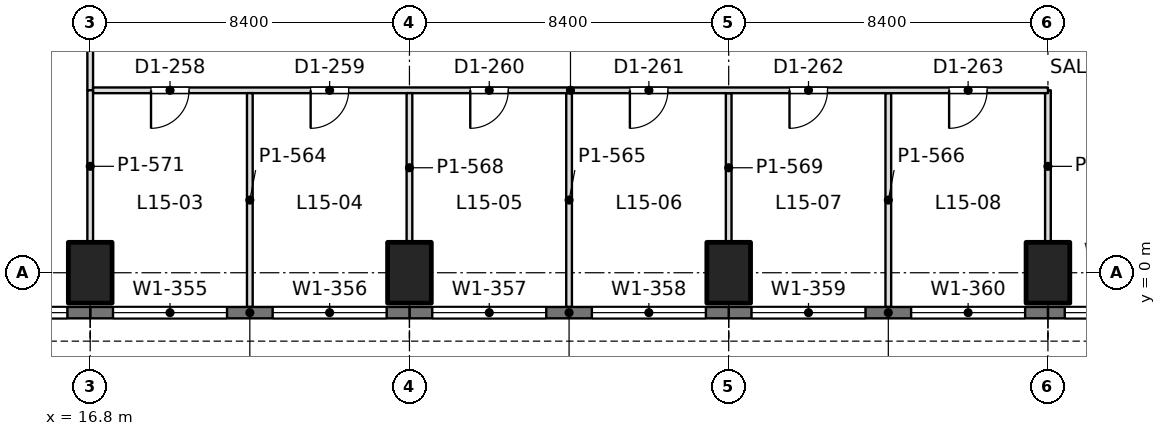
"""IFC4 building model, lengths in metres.
Left out: names, types, materials, properties, quantities, classifications, styles, units other than length and angle.
Written with IfcOpenShell. Run it as: python <this file> out.ifc"""

import sys

from ifc_helpers import new_model, si_unit, direction, frame, frame_2d, origin, origin_2d, place, context, subcontext, project, spatial, rectangle, extrude, element, fill, save


model = new_model("IFC4")
c1 = context("Model", 3, precision=1e-05, world=origin(), true_north=direction((0.0, 1.0)))
c2 = subcontext(c1, "Body", "Model", "MODEL_VIEW")
j1 = project(units=[si_unit("LENGTHUNIT", "METRE"), si_unit("PLANEANGLEUNIT", "RADIAN")], contexts=[c1])
p1 = place(None, origin())
s1 = spatial("IfcSite", under=j1, at=p1, CompositionType="ELEMENT")
p2 = place(p1, origin())
s2 = spatial("IfcBuilding", under=s1, at=p2, CompositionType="ELEMENT")
p3 = place(p2, frame((0.0, 0.0, 68.4)))
s3 = spatial("IfcBuildingStorey", under=s2, at=p3, CompositionType="ELEMENT", Elevation=68.4)
for number, where, z_axis, x_axis in (
    (1, (16.8, 0.0, 0.0), (0.0, 0.0, 1.0), (1.0, 0.0, 0.0)),
    (2, (25.2, 0.0, 0.0), (0.0, 0.0, 1.0), (1.0, 0.0, 0.0)),
    (3, (33.6, 0.0, 0.0), (0.0, 0.0, 1.0), (1.0, 0.0, 0.0)),
    (4, (42.0, 0.0, 0.0), (0.0, 0.0, 1.0), (1.0, 0.0, 0.0)),
):
    element("IfcColumn", number, at=place(p3, frame(where, z_axis=z_axis, x_axis=x_axis)), inside=s3, PredefinedType="COLUMN", context=c2, shape_type="SweptSolid", body=[
        extrude(rectangle(XDim=1.15, YDim=1.6, at=origin_2d()), origin(), (0.0, 0.0, 1.0), 4.5),
    ])
p4 = place(p3, frame((50.085, -1.05, 0.0), z_axis=(0.0, 0.0, 1.0), x_axis=(-1.0, 0.0, 0.0)))
e5 = element("IfcWall", 5, at=p4, inside=s3, PredefinedType="SOLIDWALL", context=c2, shape_type="SweptSolid", body=[
    extrude(rectangle(XDim=8.085, YDim=0.3, at=frame_2d((4.042, 0.0))), origin(), (0.0, 0.0, 1.0), 4.34),
])
p5 = place(p4, frame((0.443, 0.0, 0.9)))
e6 = element("IfcOpeningElement", 6, at=p5, cuts=e5, PredefinedType="OPENING", context=c2, shape_type="SweptSolid", body=[
    extrude(rectangle(XDim=3.0, YDim=1.9, at=frame_2d((1.5, 0.95))), frame((0.0, 0.16, 0.0), z_axis=(0.0, -1.0, 0.0), x_axis=(1.0, 0.0, 0.0)), (0.0, 0.0, 1.0), 0.32),
])
p6 = place(p4, frame((4.643, 0.0, 0.9)))
e7 = element("IfcOpeningElement", 7, at=p6, cuts=e5, PredefinedType="OPENING", context=c2, shape_type="SweptSolid", body=[
    extrude(rectangle(XDim=3.0, YDim=1.9, at=frame_2d((1.5, 0.95))), frame((0.0, 0.16, 0.0), z_axis=(0.0, -1.0, 0.0), x_axis=(1.0, 0.0, 0.0)), (0.0, 0.0, 1.0), 0.32),
])
p7 = place(p3, frame((42.0, -1.05, 0.0), z_axis=(0.0, 0.0, 1.0), x_axis=(-1.0, 0.0, 0.0)))
e8 = element("IfcWall", 8, at=p7, inside=s3, PredefinedType="SOLIDWALL", context=c2, shape_type="SweptSolid", body=[
    extrude(rectangle(XDim=8.4, YDim=0.3, at=frame_2d((4.2, 0.0))), origin(), (0.0, 0.0, 1.0), 4.34),
])
p8 = place(p7, frame((0.6, 0.0, 0.9)))
e9 = element("IfcOpeningElement", 9, at=p8, cuts=e8, PredefinedType="OPENING", context=c2, shape_type="SweptSolid", body=[
    extrude(rectangle(XDim=3.0, YDim=1.9, at=frame_2d((1.5, 0.95))), frame((0.0, 0.16, 0.0), z_axis=(0.0, -1.0, 0.0), x_axis=(1.0, 0.0, 0.0)), (0.0, 0.0, 1.0), 0.32),
])
p9 = place(p7, frame((4.8, 0.0, 0.9)))
e10 = element("IfcOpeningElement", 10, at=p9, cuts=e8, PredefinedType="OPENING", context=c2, shape_type="SweptSolid", body=[
    extrude(rectangle(XDim=3.0, YDim=1.9, at=frame_2d((1.5, 0.95))), frame((0.0, 0.16, 0.0), z_axis=(0.0, -1.0, 0.0), x_axis=(1.0, 0.0, 0.0)), (0.0, 0.0, 1.0), 0.32),
])
p10 = place(p3, frame((33.6, -1.05, 0.0), z_axis=(0.0, 0.0, 1.0), x_axis=(-1.0, 0.0, 0.0)))
e11 = element("IfcWall", 11, at=p10, inside=s3, PredefinedType="SOLIDWALL", context=c2, shape_type="SweptSolid", body=[
    extrude(rectangle(XDim=8.4, YDim=0.3, at=frame_2d((4.2, 0.0))), origin(), (0.0, 0.0, 1.0), 4.34),
])
p11 = place(p10, frame((0.6, 0.0, 0.9)))
e12 = element("IfcOpeningElement", 12, at=p11, cuts=e11, PredefinedType="OPENING", context=c2, shape_type="SweptSolid", body=[
    extrude(rectangle(XDim=3.0, YDim=1.9, at=frame_2d((1.5, 0.95))), frame((0.0, 0.16, 0.0), z_axis=(0.0, -1.0, 0.0), x_axis=(1.0, 0.0, 0.0)), (0.0, 0.0, 1.0), 0.32),
])
p12 = place(p10, frame((4.8, 0.0, 0.9)))
e13 = element("IfcOpeningElement", 13, at=p12, cuts=e11, PredefinedType="OPENING", context=c2, shape_type="SweptSolid", body=[
    extrude(rectangle(XDim=3.0, YDim=1.9, at=frame_2d((1.5, 0.95))), frame((0.0, 0.16, 0.0), z_axis=(0.0, -1.0, 0.0), x_axis=(1.0, 0.0, 0.0)), (0.0, 0.0, 1.0), 0.32),
])
p13 = place(p3, frame((25.2, -1.05, 0.0), z_axis=(0.0, 0.0, 1.0), x_axis=(-1.0, 0.0, 0.0)))
e14 = element("IfcWall", 14, at=p13, inside=s3, PredefinedType="SOLIDWALL", context=c2, shape_type="SweptSolid", body=[
    extrude(rectangle(XDim=8.4, YDim=0.3, at=frame_2d((4.2, 0.0))), origin(), (0.0, 0.0, 1.0), 4.34),
])
p14 = place(p13, frame((0.6, 0.0, 0.9)))
e15 = element("IfcOpeningElement", 15, at=p14, cuts=e14, PredefinedType="OPENING", context=c2, shape_type="SweptSolid", body=[
    extrude(rectangle(XDim=3.0, YDim=1.9, at=frame_2d((1.5, 0.95))), frame((0.0, 0.16, 0.0), z_axis=(0.0, -1.0, 0.0), x_axis=(1.0, 0.0, 0.0)), (0.0, 0.0, 1.0), 0.32),
])
p15 = place(p13, frame((4.8, 0.0, 0.9)))
e16 = element("IfcOpeningElement", 16, at=p15, cuts=e14, PredefinedType="OPENING", context=c2, shape_type="SweptSolid", body=[
    extrude(rectangle(XDim=3.0, YDim=1.9, at=frame_2d((1.5, 0.95))), frame((0.0, 0.16, 0.0), z_axis=(0.0, -1.0, 0.0), x_axis=(1.0, 0.0, 0.0)), (0.0, 0.0, 1.0), 0.32),
])
p16 = place(p3, frame((16.8, -1.05, 0.0), z_axis=(0.0, 0.0, 1.0), x_axis=(-1.0, 0.0, 0.0)))
e17 = element("IfcWall", 17, at=p16, inside=s3, PredefinedType="SOLIDWALL", context=c2, shape_type="SweptSolid", body=[
    extrude(rectangle(XDim=8.4, YDim=0.3, at=frame_2d((4.2, 0.0))), origin(), (0.0, 0.0, 1.0), 4.34),
])
p17 = place(p16, frame((0.6, 0.0, 0.9)))
e18 = element("IfcOpeningElement", 18, at=p17, cuts=e17, PredefinedType="OPENING", context=c2, shape_type="SweptSolid", body=[
    extrude(rectangle(XDim=3.0, YDim=1.9, at=frame_2d((1.5, 0.95))), frame((0.0, 0.16, 0.0), z_axis=(0.0, -1.0, 0.0), x_axis=(1.0, 0.0, 0.0)), (0.0, 0.0, 1.0), 0.32),
])
p18 = place(p16, frame((4.8, 0.0, 0.9)))
e19 = element("IfcOpeningElement", 19, at=p18, cuts=e17, PredefinedType="OPENING", context=c2, shape_type="SweptSolid", body=[
    extrude(rectangle(XDim=3.0, YDim=1.9, at=frame_2d((1.5, 0.95))), frame((0.0, 0.16, 0.0), z_axis=(0.0, -1.0, 0.0), x_axis=(1.0, 0.0, 0.0)), (0.0, 0.0, 1.0), 0.32),
])
p19 = place(p3, frame((16.874, 4.8, 0.0), z_axis=(0.0, 0.0, 1.0), x_axis=(1.0, 0.0, 0.0)))
e20 = element("IfcWall", 20, at=p19, inside=s3, PredefinedType="PARTITIONING", context=c2, shape_type="SweptSolid", body=[
    extrude(rectangle(XDim=25.126, YDim=0.15, at=frame_2d((12.563, 0.0))), origin(), (0.0, 0.0, 1.0), 3.74),
])
p20 = place(p19, frame((1.526, 0.0, 0.0)))
e21 = element("IfcOpeningElement", 21, at=p20, cuts=e20, PredefinedType="OPENING", context=c2, shape_type="SweptSolid", body=[
    extrude(rectangle(XDim=1.0, YDim=2.2, at=frame_2d((0.5, 1.1))), frame((0.0, 0.085, 0.0), z_axis=(0.0, -1.0, 0.0), x_axis=(1.0, 0.0, 0.0)), (0.0, 0.0, 1.0), 0.17),
])
p21 = place(p19, frame((5.726, 0.0, 0.0)))
e22 = element("IfcOpeningElement", 22, at=p21, cuts=e20, PredefinedType="OPENING", context=c2, shape_type="SweptSolid", body=[
    extrude(rectangle(XDim=1.0, YDim=2.2, at=frame_2d((0.5, 1.1))), frame((0.0, 0.085, 0.0), z_axis=(0.0, -1.0, 0.0), x_axis=(1.0, 0.0, 0.0)), (0.0, 0.0, 1.0), 0.17),
])
p22 = place(p19, frame((9.926, 0.0, 0.0)))
e23 = element("IfcOpeningElement", 23, at=p22, cuts=e20, PredefinedType="OPENING", context=c2, shape_type="SweptSolid", body=[
    extrude(rectangle(XDim=1.0, YDim=2.2, at=frame_2d((0.5, 1.1))), frame((0.0, 0.085, 0.0), z_axis=(0.0, -1.0, 0.0), x_axis=(1.0, 0.0, 0.0)), (0.0, 0.0, 1.0), 0.17),
])
p23 = place(p19, frame((14.126, 0.0, 0.0)))
e24 = element("IfcOpeningElement", 24, at=p23, cuts=e20, PredefinedType="OPENING", context=c2, shape_type="SweptSolid", body=[
    extrude(rectangle(XDim=1.0, YDim=2.2, at=frame_2d((0.5, 1.1))), frame((0.0, 0.085, 0.0), z_axis=(0.0, -1.0, 0.0), x_axis=(1.0, 0.0, 0.0)), (0.0, 0.0, 1.0), 0.17),
])
p24 = place(p19, frame((18.326, 0.0, 0.0)))
e25 = element("IfcOpeningElement", 25, at=p24, cuts=e20, PredefinedType="OPENING", context=c2, shape_type="SweptSolid", body=[
    extrude(rectangle(XDim=1.0, YDim=2.2, at=frame_2d((0.5, 1.1))), frame((0.0, 0.085, 0.0), z_axis=(0.0, -1.0, 0.0), x_axis=(1.0, 0.0, 0.0)), (0.0, 0.0, 1.0), 0.17),
])
p25 = place(p19, frame((22.526, 0.0, 0.0)))
e26 = element("IfcOpeningElement", 26, at=p25, cuts=e20, PredefinedType="OPENING", context=c2, shape_type="SweptSolid", body=[
    extrude(rectangle(XDim=1.0, YDim=2.2, at=frame_2d((0.5, 1.1))), frame((0.0, 0.085, 0.0), z_axis=(0.0, -1.0, 0.0), x_axis=(1.0, 0.0, 0.0)), (0.0, 0.0, 1.0), 0.17),
])
p26 = place(p3, frame((16.8, 0.799, 0.0), z_axis=(0.0, 0.0, 1.0), x_axis=(0.0, 1.0, 0.0)))
e27 = element("IfcWall", 27, at=p26, inside=s3, PredefinedType="PARTITIONING", context=c2, shape_type="SweptSolid", body=[
    extrude(rectangle(XDim=4.003, YDim=0.15, at=frame_2d((2.001, 0.0))), origin(), (0.0, 0.0, 1.0), 3.74),
])
p27 = place(p3, frame((21.0, -0.902, 0.0), z_axis=(0.0, 0.0, 1.0), x_axis=(0.0, 1.0, 0.0)))
e28 = element("IfcWall", 28, at=p27, inside=s3, PredefinedType="PARTITIONING", context=c2, shape_type="SweptSolid", body=[
    extrude(rectangle(XDim=5.628, YDim=0.15, at=frame_2d((2.814, 0.0))), origin(), (0.0, 0.0, 1.0), 3.84),
])
p28 = place(p3, frame((25.2, 0.799, 0.0), z_axis=(0.0, 0.0, 1.0), x_axis=(0.0, 1.0, 0.0)))
e29 = element("IfcWall", 29, at=p28, inside=s3, PredefinedType="PARTITIONING", context=c2, shape_type="SweptSolid", body=[
    extrude(rectangle(XDim=3.927, YDim=0.15, at=frame_2d((1.963, 0.0))), origin(), (0.0, 0.0, 1.0), 3.74),
])
p29 = place(p3, frame((29.4, -0.902, 0.0), z_axis=(0.0, 0.0, 1.0), x_axis=(0.0, 1.0, 0.0)))
e30 = element("IfcWall", 30, at=p29, inside=s3, PredefinedType="PARTITIONING", context=c2, shape_type="SweptSolid", body=[
    extrude(rectangle(XDim=5.628, YDim=0.15, at=frame_2d((2.814, 0.0))), origin(), (0.0, 0.0, 1.0), 3.84),
])
p30 = place(p3, frame((33.6, 0.799, 0.0), z_axis=(0.0, 0.0, 1.0), x_axis=(0.0, 1.0, 0.0)))
e31 = element("IfcWall", 31, at=p30, inside=s3, PredefinedType="PARTITIONING", context=c2, shape_type="SweptSolid", body=[
    extrude(rectangle(XDim=3.927, YDim=0.15, at=frame_2d((1.963, 0.0))), origin(), (0.0, 0.0, 1.0), 3.74),
])
p31 = place(p3, frame((37.8, -0.902, 0.0), z_axis=(0.0, 0.0, 1.0), x_axis=(0.0, 1.0, 0.0)))
e32 = element("IfcWall", 32, at=p31, inside=s3, PredefinedType="PARTITIONING", context=c2, shape_type="SweptSolid", body=[
    extrude(rectangle(XDim=5.628, YDim=0.15, at=frame_2d((2.814, 0.0))), origin(), (0.0, 0.0, 1.0), 3.84),
])
p32 = place(p3, frame((42.0, 0.799, 0.0), z_axis=(0.0, 0.0, 1.0), x_axis=(0.0, 1.0, 0.0)))
e33 = element("IfcWall", 33, at=p32, inside=s3, PredefinedType="PARTITIONING", context=c2, shape_type="SweptSolid", body=[
    extrude(rectangle(XDim=4.001, YDim=0.15, at=frame_2d((2.0, 0.0))), origin(), (0.0, 0.0, 1.0), 3.74),
])
p33 = place(p3, frame((16.8, 4.798, 0.0), z_axis=(0.0, 0.0, 1.0), x_axis=(0.0, 1.0, 0.0)))
e34 = element("IfcWall", 34, at=p33, inside=s3, PredefinedType="PARTITIONING", context=c2, shape_type="SweptSolid", body=[
    extrude(rectangle(XDim=2.703, YDim=0.15, at=frame_2d((1.352, 0.0))), origin(), (0.0, 0.0, 1.0), 3.74),
])
p34 = place(p6, origin())
e35 = element("IfcWindow", 35, at=p34, inside=s3, PartitioningType="SINGLE_PANEL", PredefinedType="WINDOW", context=c2, shape_type="SweptSolid", body=[
    extrude(rectangle(XDim=3.0, YDim=1.9, at=frame_2d((1.5, 0.95))), frame((0.0, 0.03, 0.0), z_axis=(0.0, -1.0, 0.0), x_axis=(1.0, 0.0, 0.0)), (0.0, 0.0, 1.0), 0.06),
])
fill(e7, e35)
p35 = place(p8, origin())
e36 = element("IfcWindow", 36, at=p35, inside=s3, PartitioningType="SINGLE_PANEL", PredefinedType="WINDOW", context=c2, shape_type="SweptSolid", body=[
    extrude(rectangle(XDim=3.0, YDim=1.9, at=frame_2d((1.5, 0.95))), frame((0.0, 0.03, 0.0), z_axis=(0.0, -1.0, 0.0), x_axis=(1.0, 0.0, 0.0)), (0.0, 0.0, 1.0), 0.06),
])
fill(e9, e36)
p36 = place(p9, origin())
e37 = element("IfcWindow", 37, at=p36, inside=s3, PartitioningType="SINGLE_PANEL", PredefinedType="WINDOW", context=c2, shape_type="SweptSolid", body=[
    extrude(rectangle(XDim=3.0, YDim=1.9, at=frame_2d((1.5, 0.95))), frame((0.0, 0.03, 0.0), z_axis=(0.0, -1.0, 0.0), x_axis=(1.0, 0.0, 0.0)), (0.0, 0.0, 1.0), 0.06),
])
fill(e10, e37)
p37 = place(p11, origin())
e38 = element("IfcWindow", 38, at=p37, inside=s3, PartitioningType="SINGLE_PANEL", PredefinedType="WINDOW", context=c2, shape_type="SweptSolid", body=[
    extrude(rectangle(XDim=3.0, YDim=1.9, at=frame_2d((1.5, 0.95))), frame((0.0, 0.03, 0.0), z_axis=(0.0, -1.0, 0.0), x_axis=(1.0, 0.0, 0.0)), (0.0, 0.0, 1.0), 0.06),
])
fill(e12, e38)
p38 = place(p12, origin())
e39 = element("IfcWindow", 39, at=p38, inside=s3, PartitioningType="SINGLE_PANEL", PredefinedType="WINDOW", context=c2, shape_type="SweptSolid", body=[
    extrude(rectangle(XDim=3.0, YDim=1.9, at=frame_2d((1.5, 0.95))), frame((0.0, 0.03, 0.0), z_axis=(0.0, -1.0, 0.0), x_axis=(1.0, 0.0, 0.0)), (0.0, 0.0, 1.0), 0.06),
])
fill(e13, e39)
p39 = place(p14, origin())
e40 = element("IfcWindow", 40, at=p39, inside=s3, PartitioningType="SINGLE_PANEL", PredefinedType="WINDOW", context=c2, shape_type="SweptSolid", body=[
    extrude(rectangle(XDim=3.0, YDim=1.9, at=frame_2d((1.5, 0.95))), frame((0.0, 0.03, 0.0), z_axis=(0.0, -1.0, 0.0), x_axis=(1.0, 0.0, 0.0)), (0.0, 0.0, 1.0), 0.06),
])
fill(e15, e40)
p40 = place(p15, origin())
e41 = element("IfcWindow", 41, at=p40, inside=s3, PartitioningType="SINGLE_PANEL", PredefinedType="WINDOW", context=c2, shape_type="SweptSolid", body=[
    extrude(rectangle(XDim=3.0, YDim=1.9, at=frame_2d((1.5, 0.95))), frame((0.0, 0.03, 0.0), z_axis=(0.0, -1.0, 0.0), x_axis=(1.0, 0.0, 0.0)), (0.0, 0.0, 1.0), 0.06),
])
fill(e16, e41)
p41 = place(p17, origin())
e42 = element("IfcWindow", 42, at=p41, inside=s3, PartitioningType="SINGLE_PANEL", PredefinedType="WINDOW", context=c2, shape_type="SweptSolid", body=[
    extrude(rectangle(XDim=3.0, YDim=1.9, at=frame_2d((1.5, 0.95))), frame((0.0, 0.03, 0.0), z_axis=(0.0, -1.0, 0.0), x_axis=(1.0, 0.0, 0.0)), (0.0, 0.0, 1.0), 0.06),
])
fill(e18, e42)
p42 = place(p20, frame((1.0, 0.0, 0.0), z_axis=(0.0, 0.0, 1.0), x_axis=(-1.0, 0.0, 0.0)))
e43 = element("IfcDoor", 43, at=p42, inside=s3, OperationType="SINGLE_SWING_RIGHT", PredefinedType="DOOR", context=c2, shape_type="SweptSolid", body=[
    extrude(rectangle(XDim=1.0, YDim=2.2, at=frame_2d((0.5, 1.1))), frame((0.0, 0.025, 0.0), z_axis=(0.0, -1.0, 0.0), x_axis=(1.0, 0.0, 0.0)), (0.0, 0.0, 1.0), 0.05),
])
fill(e21, e43)
p43 = place(p21, frame((1.0, 0.0, 0.0), z_axis=(0.0, 0.0, 1.0), x_axis=(-1.0, 0.0, 0.0)))
e44 = element("IfcDoor", 44, at=p43, inside=s3, OperationType="SINGLE_SWING_RIGHT", PredefinedType="DOOR", context=c2, shape_type="SweptSolid", body=[
    extrude(rectangle(XDim=1.0, YDim=2.2, at=frame_2d((0.5, 1.1))), frame((0.0, 0.025, 0.0), z_axis=(0.0, -1.0, 0.0), x_axis=(1.0, 0.0, 0.0)), (0.0, 0.0, 1.0), 0.05),
])
fill(e22, e44)
p44 = place(p22, frame((1.0, 0.0, 0.0), z_axis=(0.0, 0.0, 1.0), x_axis=(-1.0, 0.0, 0.0)))
e45 = element("IfcDoor", 45, at=p44, inside=s3, OperationType="SINGLE_SWING_RIGHT", PredefinedType="DOOR", context=c2, shape_type="SweptSolid", body=[
    extrude(rectangle(XDim=1.0, YDim=2.2, at=frame_2d((0.5, 1.1))), frame((0.0, 0.025, 0.0), z_axis=(0.0, -1.0, 0.0), x_axis=(1.0, 0.0, 0.0)), (0.0, 0.0, 1.0), 0.05),
])
fill(e23, e45)
p45 = place(p23, frame((1.0, 0.0, 0.0), z_axis=(0.0, 0.0, 1.0), x_axis=(-1.0, 0.0, 0.0)))
e46 = element("IfcDoor", 46, at=p45, inside=s3, OperationType="SINGLE_SWING_RIGHT", PredefinedType="DOOR", context=c2, shape_type="SweptSolid", body=[
    extrude(rectangle(XDim=1.0, YDim=2.2, at=frame_2d((0.5, 1.1))), frame((0.0, 0.025, 0.0), z_axis=(0.0, -1.0, 0.0), x_axis=(1.0, 0.0, 0.0)), (0.0, 0.0, 1.0), 0.05),
])
fill(e24, e46)
p46 = place(p24, frame((1.0, 0.0, 0.0), z_axis=(0.0, 0.0, 1.0), x_axis=(-1.0, 0.0, 0.0)))
e47 = element("IfcDoor", 47, at=p46, inside=s3, OperationType="SINGLE_SWING_RIGHT", PredefinedType="DOOR", context=c2, shape_type="SweptSolid", body=[
    extrude(rectangle(XDim=1.0, YDim=2.2, at=frame_2d((0.5, 1.1))), frame((0.0, 0.025, 0.0), z_axis=(0.0, -1.0, 0.0), x_axis=(1.0, 0.0, 0.0)), (0.0, 0.0, 1.0), 0.05),
])
fill(e25, e47)
p47 = place(p25, frame((1.0, 0.0, 0.0), z_axis=(0.0, 0.0, 1.0), x_axis=(-1.0, 0.0, 0.0)))
e48 = element("IfcDoor", 48, at=p47, inside=s3, OperationType="SINGLE_SWING_RIGHT", PredefinedType="DOOR", context=c2, shape_type="SweptSolid", body=[
    extrude(rectangle(XDim=1.0, YDim=2.2, at=frame_2d((0.5, 1.1))), frame((0.0, 0.025, 0.0), z_axis=(0.0, -1.0, 0.0), x_axis=(1.0, 0.0, 0.0)), (0.0, 0.0, 1.0), 0.05),
])
fill(e26, e48)
save(model, sys.argv[1])
